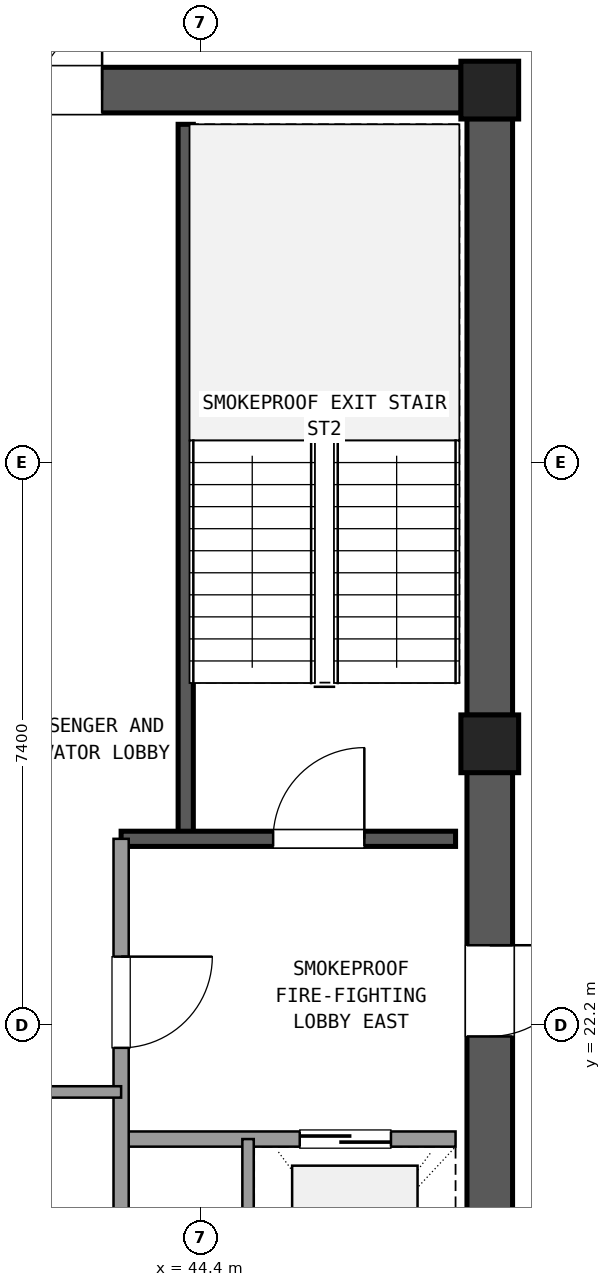
"""IFC4 building model, lengths in metres.
Left out: names, types, materials, properties, quantities, classifications, styles, units other than length and angle.
Written with IfcOpenShell. Run it as: python <this file> out.ifc"""

import sys

from ifc_helpers import new_model, si_unit, direction, frame, frame_2d, origin, origin_2d, place, context, subcontext, project, spatial, rectangle, extrude, element, fill, save


model = new_model("IFC4")
c1 = context("Model", 3, precision=1e-05, world=origin(), true_north=direction((0.0, 1.0)))
c2 = subcontext(c1, "Body", "Model", "MODEL_VIEW")
j1 = project(units=[si_unit("LENGTHUNIT", "METRE"), si_unit("PLANEANGLEUNIT", "RADIAN")], contexts=[c1])
p1 = place(None, origin())
s1 = spatial("IfcSite", under=j1, at=p1, CompositionType="ELEMENT")
p2 = place(p1, origin())
s2 = spatial("IfcBuilding", under=s1, at=p2, CompositionType="ELEMENT")
p3 = place(p2, frame((0.0, 0.0, 294.66)))
s3 = spatial("IfcBuildingStorey", under=s2, at=p3, CompositionType="ELEMENT", Elevation=294.66)
for number, where, z_axis, x_axis in (
    (1, (48.2, 25.9, 0.0), (0.0, 0.0, 1.0), (1.0, 0.0, 0.0)),
    (2, (48.2, 34.5, 0.0), (0.0, 0.0, 1.0), (1.0, 0.0, 0.0)),
):
    element("IfcColumn", number, at=place(p3, frame(where, z_axis=z_axis, x_axis=x_axis)), inside=s3, PredefinedType="COLUMN", context=c2, shape_type="SweptSolid", body=[
        extrude(rectangle(XDim=0.76, YDim=0.76, at=origin_2d()), origin(), (0.0, 0.0, 1.0), 4.32),
    ])
p4 = place(p3, frame((48.2, 17.675, 0.0), z_axis=(0.0, 0.0, 1.0), x_axis=(0.0, 1.0, 0.0)))
e3 = element("IfcWall", 3, at=p4, inside=s3, PredefinedType="SHEAR", context=c2, shape_type="SweptSolid", body=[
    extrude(rectangle(XDim=7.85, YDim=0.6, at=frame_2d((3.925, 0.0))), origin(), (0.0, 0.0, 1.0), 4.02),
])
p5 = place(p4, frame((4.375, 0.0, 0.0)))
e4 = element("IfcOpeningElement", 4, at=p5, cuts=e3, PredefinedType="OPENING", context=c2, shape_type="SweptSolid", body=[
    extrude(rectangle(XDim=1.2, YDim=2.15, at=frame_2d((0.6, 1.075))), frame((0.0, 0.31, 0.0), z_axis=(0.0, -1.0, 0.0), x_axis=(1.0, 0.0, 0.0)), (0.0, 0.0, 1.0), 0.62),
])
p6 = place(p3, frame((48.2, 26.275, 0.0), z_axis=(0.0, 0.0, 1.0), x_axis=(0.0, 1.0, 0.0)))
e5 = element("IfcWall", 5, at=p6, inside=s3, PredefinedType="SHEAR", context=c2, shape_type="SweptSolid", body=[
    extrude(rectangle(XDim=7.85, YDim=0.6, at=frame_2d((3.925, 0.0))), origin(), (0.0, 0.0, 1.0), 4.02),
])
p7 = place(p3, frame((47.825, 34.5, 0.0), z_axis=(0.0, 0.0, 1.0), x_axis=(-1.0, 0.0, 0.0)))
e6 = element("IfcWall", 6, at=p7, inside=s3, PredefinedType="SHEAR", context=c2, shape_type="SweptSolid", body=[
    extrude(rectangle(XDim=10.45, YDim=0.6, at=frame_2d((5.225, 0.0))), origin(), (0.0, 0.0, 1.0), 4.02),
])
p8 = place(p7, frame((4.725, 0.0, 0.0)))
e7 = element("IfcOpeningElement", 7, at=p8, cuts=e6, PredefinedType="OPENING", context=c2, shape_type="SweptSolid", body=[
    extrude(rectangle(XDim=1.6, YDim=2.2, at=frame_2d((0.8, 1.1))), frame((0.0, 0.31, 0.0), z_axis=(0.0, -1.0, 0.0), x_axis=(1.0, 0.0, 0.0)), (0.0, 0.0, 1.0), 0.62),
])
p9 = place(p3, frame((44.2, 24.65, 0.0), z_axis=(0.0, 0.0, 1.0), x_axis=(0.0, 1.0, 0.0)))
e8 = element("IfcWall", 8, at=p9, inside=s3, PredefinedType="SHEAR", context=c2, shape_type="SweptSolid", body=[
    extrude(rectangle(XDim=9.4, YDim=0.2, at=frame_2d((4.7, 0.0))), origin(), (0.0, 0.0, 1.0), 4.02),
])
p10 = place(p3, frame((43.35, 24.65, 0.0), z_axis=(0.0, 0.0, 1.0), x_axis=(1.0, 0.0, 0.0)))
e9 = element("IfcWall", 9, at=p10, inside=s3, PredefinedType="SHEAR", context=c2, shape_type="SweptSolid", body=[
    extrude(rectangle(XDim=4.4, YDim=0.2, at=frame_2d((2.2, 0.0))), origin(), (0.0, 0.0, 1.0), 4.02),
])
p11 = place(p10, frame((2.0, 0.0, 0.0)))
e10 = element("IfcOpeningElement", 10, at=p11, cuts=e9, PredefinedType="OPENING", context=c2, shape_type="SweptSolid", body=[
    extrude(rectangle(XDim=1.2, YDim=2.15, at=frame_2d((0.6, 1.075))), frame((0.0, 0.11, 0.0), z_axis=(0.0, -1.0, 0.0), x_axis=(1.0, 0.0, 0.0)), (0.0, 0.0, 1.0), 0.22),
])
p12 = place(p3, frame((43.35, 20.7, 0.0), z_axis=(0.0, 0.0, 1.0), x_axis=(1.0, 0.0, 0.0)))
e11 = element("IfcWall", 11, at=p12, inside=s3, PredefinedType="SOLIDWALL", context=c2, shape_type="SweptSolid", body=[
    extrude(rectangle(XDim=4.4, YDim=0.2, at=frame_2d((2.2, 0.0))), origin(), (0.0, 0.0, 1.0), 3.31),
])
p13 = place(p12, frame((2.35, 0.0, 0.0)))
e12 = element("IfcOpeningElement", 12, at=p13, cuts=e11, PredefinedType="OPENING", context=c2, shape_type="SweptSolid", body=[
    extrude(rectangle(XDim=1.2, YDim=2.15, at=frame_2d((0.6, 1.075))), frame((0.0, 0.11, 0.0), z_axis=(0.0, -1.0, 0.0), x_axis=(1.0, 0.0, 0.0)), (0.0, 0.0, 1.0), 0.22),
])
p14 = place(p3, frame((43.35, 17.75, 0.0), z_axis=(0.0, 0.0, 1.0), x_axis=(0.0, 1.0, 0.0)))
e13 = element("IfcWall", 13, at=p14, inside=s3, PredefinedType="SOLIDWALL", context=c2, shape_type="SweptSolid", body=[
    extrude(rectangle(XDim=6.9, YDim=0.2, at=frame_2d((3.45, 0.0))), origin(), (0.0, 0.0, 1.0), 3.31),
])
p15 = place(p14, frame((4.15, 0.0, 0.0)))
e14 = element("IfcOpeningElement", 14, at=p15, cuts=e13, PredefinedType="OPENING", context=c2, shape_type="SweptSolid", body=[
    extrude(rectangle(XDim=1.2, YDim=2.15, at=frame_2d((0.6, 1.075))), frame((0.0, 0.11, 0.0), z_axis=(0.0, -1.0, 0.0), x_axis=(1.0, 0.0, 0.0)), (0.0, 0.0, 1.0), 0.22),
])
p16 = place(p3, frame((45.02, 17.75, 0.0), z_axis=(0.0, 0.0, 1.0), x_axis=(0.0, 1.0, 0.0)))
e15 = element("IfcWall", 15, at=p16, inside=s3, PredefinedType="PARTITIONING", context=c2, shape_type="SweptSolid", body=[
    extrude(rectangle(XDim=2.95, YDim=0.15, at=frame_2d((1.475, 0.0))), origin(), (0.0, 0.0, 1.0), 3.31),
])
p17 = place(p3, frame((37.25, 21.32, 0.0), z_axis=(0.0, 0.0, 1.0), x_axis=(1.0, 0.0, 0.0)))
e16 = element("IfcWall", 16, at=p17, inside=s3, PredefinedType="PARTITIONING", context=c2, shape_type="SweptSolid", body=[
    extrude(rectangle(XDim=6.1, YDim=0.15, at=frame_2d((3.05, 0.0))), origin(), (0.0, 0.0, 1.0), 3.31),
])
p18 = place(p17, frame((0.55, 0.0, 0.0)))
e17 = element("IfcOpeningElement", 17, at=p18, cuts=e16, PredefinedType="OPENING", context=c2, shape_type="SweptSolid", body=[
    extrude(rectangle(XDim=1.0, YDim=2.15, at=frame_2d((0.5, 1.075))), frame((0.0, 0.085, 0.0), z_axis=(0.0, -1.0, 0.0), x_axis=(1.0, 0.0, 0.0)), (0.0, 0.0, 1.0), 0.17),
])
p19 = place(p17, frame((3.5, 0.0, 0.0)))
e18 = element("IfcOpeningElement", 18, at=p19, cuts=e16, PredefinedType="OPENING", context=c2, shape_type="SweptSolid", body=[
    extrude(rectangle(XDim=1.0, YDim=2.15, at=frame_2d((0.5, 1.075))), frame((0.0, 0.085, 0.0), z_axis=(0.0, -1.0, 0.0), x_axis=(1.0, 0.0, 0.0)), (0.0, 0.0, 1.0), 0.17),
])
p20 = place(p11, origin())
e19 = element("IfcDoor", 19, at=p20, inside=s3, OperationType="SINGLE_SWING_RIGHT", PredefinedType="DOOR", context=c2, shape_type="SweptSolid", body=[
    extrude(rectangle(XDim=1.2, YDim=2.15, at=frame_2d((0.6, 1.075))), frame((0.0, 0.025, 0.0), z_axis=(0.0, -1.0, 0.0), x_axis=(1.0, 0.0, 0.0)), (0.0, 0.0, 1.0), 0.05),
])
fill(e10, e19)
p21 = place(p13, origin())
e20 = element("IfcDoor", 20, at=p21, inside=s3, OperationType="SLIDING_TO_RIGHT", PredefinedType="DOOR", context=c2, shape_type="SweptSolid", body=[
    extrude(rectangle(XDim=1.2, YDim=2.15, at=frame_2d((0.6, 1.075))), frame((0.0, 0.025, 0.0), z_axis=(0.0, -1.0, 0.0), x_axis=(1.0, 0.0, 0.0)), (0.0, 0.0, 1.0), 0.05),
])
fill(e12, e20)
p22 = place(p15, frame((1.2, 0.0, 0.0), z_axis=(0.0, 0.0, 1.0), x_axis=(-1.0, 0.0, 0.0)))
e21 = element("IfcDoor", 21, at=p22, inside=s3, OperationType="SINGLE_SWING_RIGHT", PredefinedType="DOOR", context=c2, shape_type="SweptSolid", body=[
    extrude(rectangle(XDim=1.2, YDim=2.15, at=frame_2d((0.6, 1.075))), frame((0.0, 0.025, 0.0), z_axis=(0.0, -1.0, 0.0), x_axis=(1.0, 0.0, 0.0)), (0.0, 0.0, 1.0), 0.05),
])
fill(e14, e21)
p23 = place(p5, frame((1.2, 0.0, 0.0), z_axis=(0.0, 0.0, 1.0), x_axis=(-1.0, 0.0, 0.0)))
e22 = element("IfcDoor", 22, at=p23, inside=s3, OperationType="SINGLE_SWING_RIGHT", PredefinedType="DOOR", context=c2, shape_type="SweptSolid", body=[
    extrude(rectangle(XDim=1.2, YDim=2.15, at=frame_2d((0.6, 1.075))), frame((0.0, 0.025, 0.0), z_axis=(0.0, -1.0, 0.0), x_axis=(1.0, 0.0, 0.0)), (0.0, 0.0, 1.0), 0.05),
])
fill(e4, e22)
p24 = place(p8, frame((1.6, 0.0, 0.0), z_axis=(0.0, 0.0, 1.0), x_axis=(-1.0, 0.0, 0.0)))
e23 = element("IfcDoor", 23, at=p24, inside=s3, OperationType="DOUBLE_DOOR_SINGLE_SWING", PredefinedType="DOOR", context=c2, shape_type="SweptSolid", body=[
    extrude(rectangle(XDim=1.6, YDim=2.2, at=frame_2d((0.8, 1.1))), frame((0.0, 0.025, 0.0), z_axis=(0.0, -1.0, 0.0), x_axis=(1.0, 0.0, 0.0)), (0.0, 0.0, 1.0), 0.05),
])
fill(e7, e23)
save(model, sys.argv[1])
